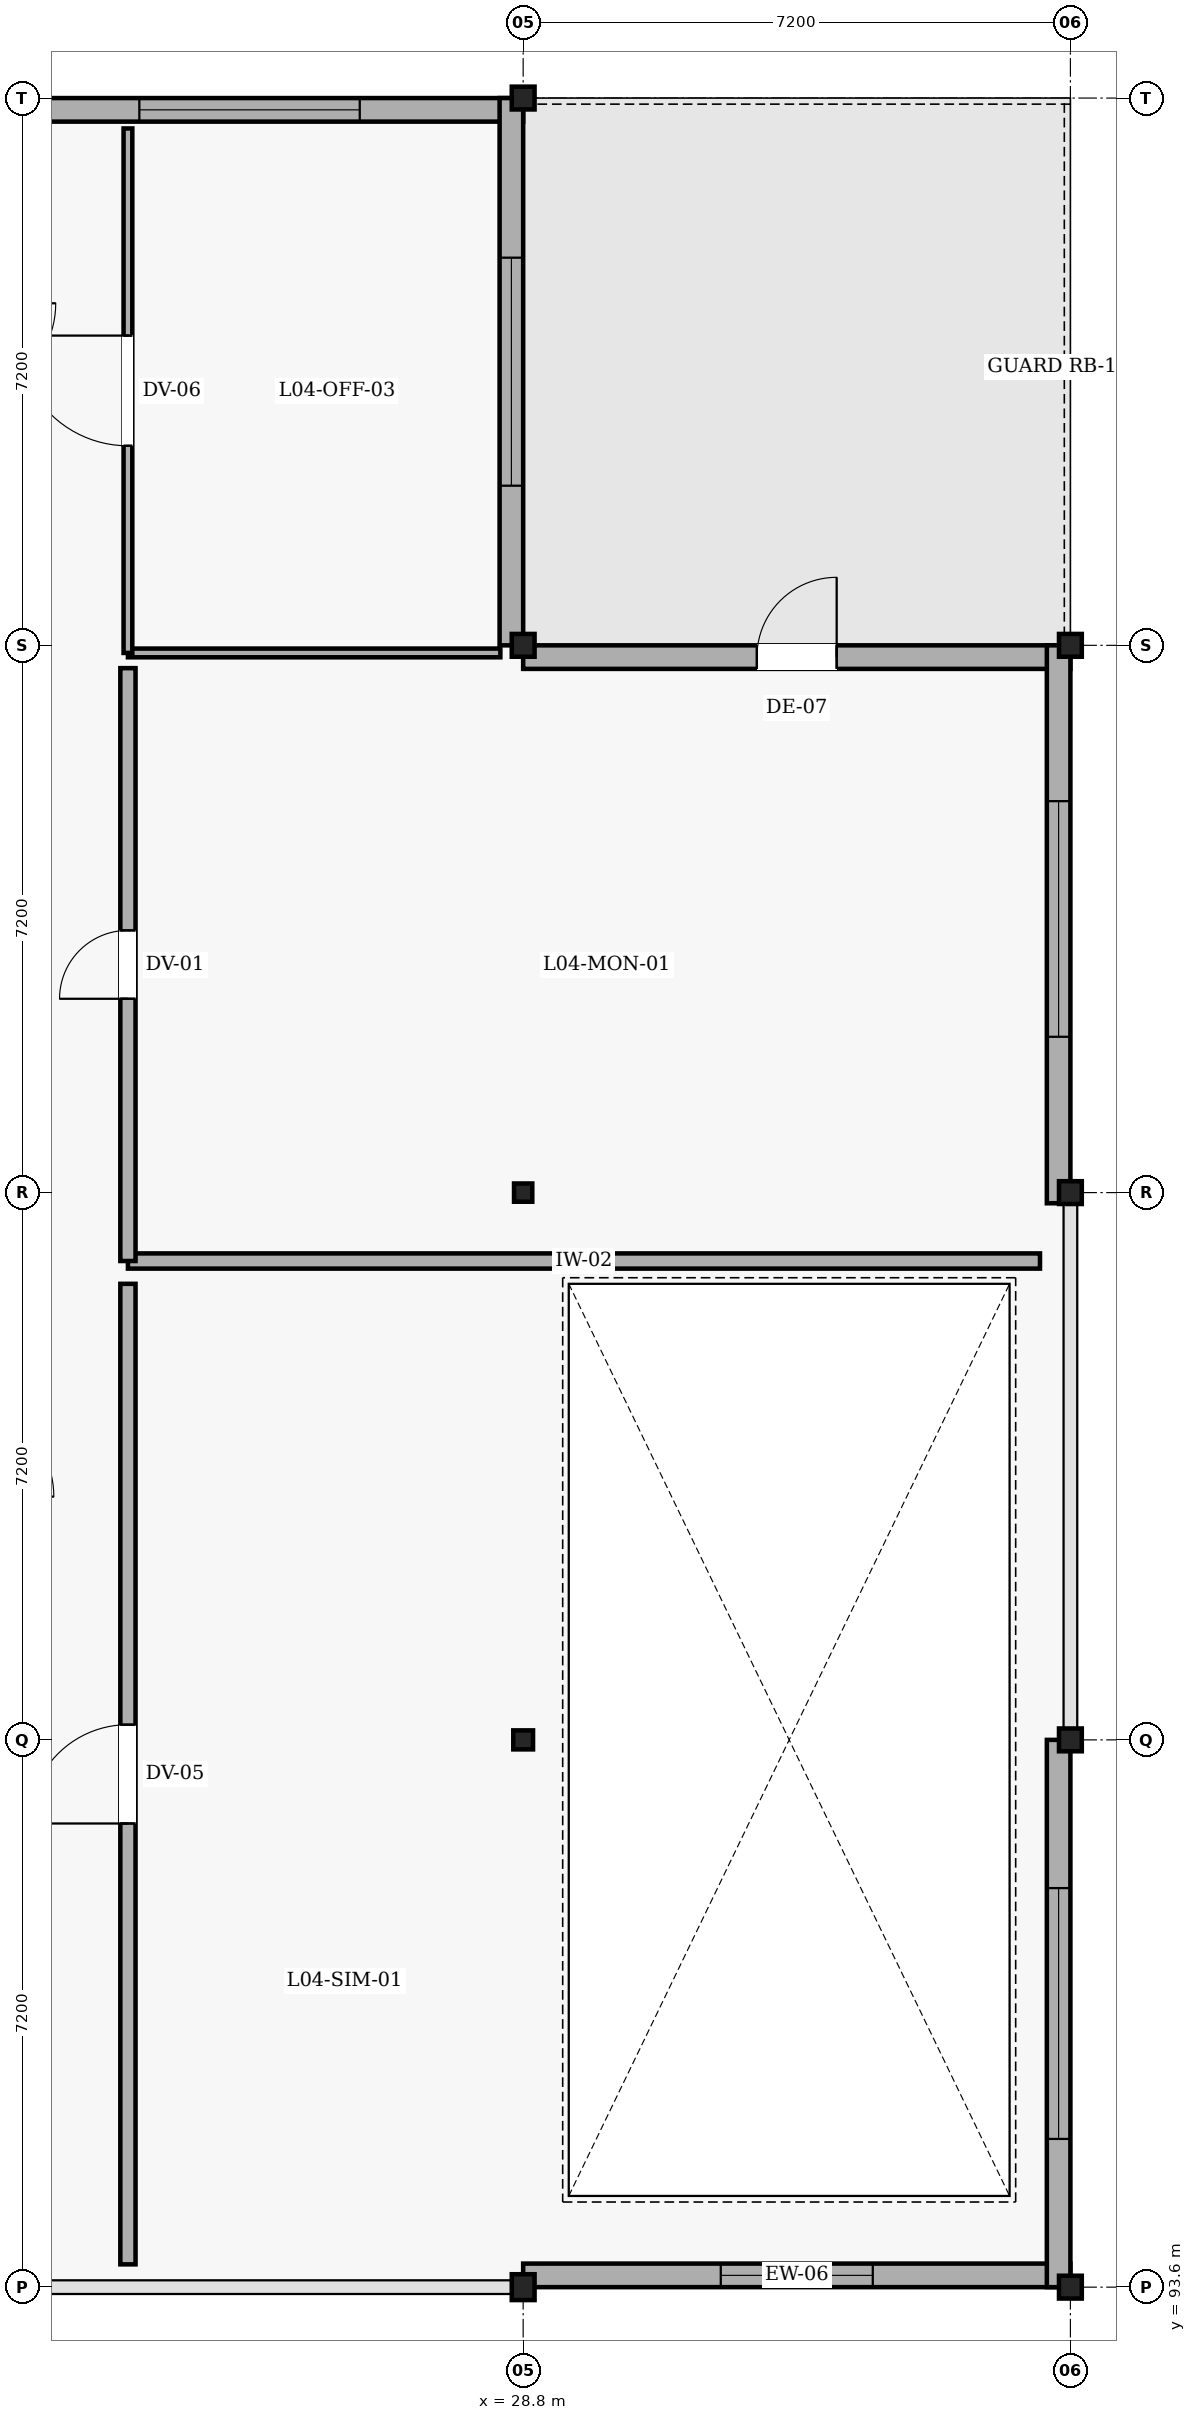
"""IFC4 building model, lengths in metres.
Left out: names, types, materials, properties, quantities, classifications, styles, units other than length and angle.
Written with IfcOpenShell. Run it as: python <this file> out.ifc"""

import sys

from ifc_helpers import new_model, si_unit, direction, frame, frame_2d, origin, origin_2d, place, context, subcontext, project, spatial, rectangle, hollow_rectangle, i_section, extrude, element, fill, save


model = new_model("IFC4")
c1 = context("Model", 3, precision=1e-05, world=origin(), true_north=direction((0.0, 1.0)))
c2 = subcontext(c1, "Body", "Model", "MODEL_VIEW")
j1 = project(units=[si_unit("LENGTHUNIT", "METRE"), si_unit("PLANEANGLEUNIT", "RADIAN")], contexts=[c1])
p1 = place(None, origin())
s1 = spatial("IfcSite", under=j1, at=p1, CompositionType="ELEMENT")
p2 = place(p1, origin())
s2 = spatial("IfcBuilding", under=s1, at=p2, CompositionType="ELEMENT")
p3 = place(p2, frame((0.0, 0.0, 18.0)))
s3 = spatial("IfcBuildingStorey", under=s2, at=p3, CompositionType="ELEMENT", Elevation=18.0)
p4 = place(p3, frame((28.8, 93.6, 0.0), z_axis=(0.0, 0.0, 1.0), x_axis=(1.0, 0.0, 0.0)))
e1 = element("IfcColumn", 1, at=p4, inside=s3, PredefinedType="COLUMN", context=c2, shape_type="SweptSolid", body=[
    extrude(i_section(OverallWidth=0.3, OverallDepth=0.34, WebThickness=0.012, FlangeThickness=0.021, FilletRadius=0.027, at=origin_2d()), origin(), (0.0, 0.0, 1.0), 3.3),
])
p5 = place(p3, frame((28.8, 100.8, 0.0), z_axis=(0.0, 0.0, 1.0), x_axis=(1.0, 0.0, 0.0)))
e2 = element("IfcColumn", 2, at=p5, inside=s3, PredefinedType="COLUMN", context=c2, shape_type="SweptSolid", body=[
    extrude(i_section(OverallWidth=0.26, OverallDepth=0.25, WebThickness=0.008, FlangeThickness=0.012, FilletRadius=0.024, at=origin_2d()), origin(), (0.0, 0.0, 1.0), 3.3),
])
p6 = place(p3, frame((28.8, 108.0, 0.0), z_axis=(0.0, 0.0, 1.0), x_axis=(1.0, 0.0, 0.0)))
e3 = element("IfcColumn", 3, at=p6, inside=s3, PredefinedType="COLUMN", context=c2, shape_type="SweptSolid", body=[
    extrude(i_section(OverallWidth=0.24, OverallDepth=0.24, WebThickness=0.01, FlangeThickness=0.017, FilletRadius=0.021, at=origin_2d()), origin(), (0.0, 0.0, 1.0), 3.3),
])
for number, where, z_axis, x_axis in (
    (4, (28.8, 115.2, 0.0), (0.0, 0.0, 1.0), (1.0, 0.0, 0.0)),
    (5, (28.8, 122.4, 0.0), (0.0, 0.0, 1.0), (1.0, 0.0, 0.0)),
):
    element("IfcColumn", number, at=place(p3, frame(where, z_axis=z_axis, x_axis=x_axis)), inside=s3, PredefinedType="COLUMN", context=c2, shape_type="SweptSolid", body=[
        extrude(hollow_rectangle(XDim=0.3, YDim=0.3, WallThickness=0.012, at=origin_2d()), origin(), (0.0, 0.0, 1.0), 3.3),
    ])
for number, where, z_axis, x_axis in (
    (6, (36.0, 93.6, 0.0), (0.0, 0.0, 1.0), (1.0, 0.0, 0.0)),
    (7, (36.0, 100.8, 0.0), (0.0, 0.0, 1.0), (1.0, 0.0, 0.0)),
    (8, (36.0, 108.0, 0.0), (0.0, 0.0, 1.0), (1.0, 0.0, 0.0)),
    (9, (36.0, 115.2, 0.0), (0.0, 0.0, 1.0), (1.0, 0.0, 0.0)),
):
    element("IfcColumn", number, at=place(p3, frame(where, z_axis=z_axis, x_axis=x_axis)), inside=s3, PredefinedType="COLUMN", context=c2, shape_type="SweptSolid", body=[
        extrude(hollow_rectangle(XDim=0.3, YDim=0.3, WallThickness=0.012, at=origin_2d()), origin(), (0.0, 0.0, 1.0), 3.36),
    ])
p7 = place(p3, frame((36.0, 93.755, 0.0), z_axis=(0.0, 0.0, 1.0), x_axis=(-1.0, 0.0, 0.0)))
e10 = element("IfcWall", 10, at=p7, inside=s3, PredefinedType="SOLIDWALL", context=c2, shape_type="SweptSolid", body=[
    extrude(rectangle(XDim=7.2, YDim=0.31, at=frame_2d((3.6, 0.0))), origin(), (0.0, 0.0, 1.0), 3.06),
])
p8 = place(p7, frame((2.6, 0.0, 0.9)))
e11 = element("IfcOpeningElement", 11, at=p8, cuts=e10, PredefinedType="OPENING", context=c2, shape_type="SweptSolid", body=[
    extrude(rectangle(XDim=2.0, YDim=1.65, at=frame_2d((1.0, 0.825))), frame((0.0, 0.165, 0.0), z_axis=(0.0, -1.0, 0.0), x_axis=(1.0, 0.0, 0.0)), (0.0, 0.0, 1.0), 0.33),
])
p9 = place(p3, frame((21.6, 122.245, 0.0), z_axis=(0.0, 0.0, 1.0), x_axis=(1.0, 0.0, 0.0)))
e12 = element("IfcWall", 12, at=p9, inside=s3, PredefinedType="SOLIDWALL", context=c2, shape_type="SweptSolid", body=[
    extrude(rectangle(XDim=7.2, YDim=0.31, at=frame_2d((3.6, 0.0))), origin(), (0.0, 0.0, 1.0), 3.0),
])
p10 = place(p9, frame((2.15, 0.0, 0.9)))
e13 = element("IfcOpeningElement", 13, at=p10, cuts=e12, PredefinedType="OPENING", context=c2, shape_type="SweptSolid", body=[
    extrude(rectangle(XDim=2.9, YDim=1.7, at=frame_2d((1.45, 0.85))), frame((0.0, 0.165, 0.0), z_axis=(0.0, -1.0, 0.0), x_axis=(1.0, 0.0, 0.0)), (0.0, 0.0, 1.0), 0.33),
])
p11 = place(p3, frame((28.645, 122.4, 0.0), z_axis=(0.0, 0.0, 1.0), x_axis=(0.0, -1.0, 0.0)))
e14 = element("IfcWall", 14, at=p11, inside=s3, PredefinedType="SOLIDWALL", context=c2, shape_type="SweptSolid", body=[
    extrude(rectangle(XDim=7.2, YDim=0.31, at=frame_2d((3.6, 0.0))), origin(), (0.0, 0.0, 1.0), 3.0),
])
p12 = place(p11, frame((2.1, 0.0, 0.9)))
e15 = element("IfcOpeningElement", 15, at=p12, cuts=e14, PredefinedType="OPENING", context=c2, shape_type="SweptSolid", body=[
    extrude(rectangle(XDim=3.0, YDim=1.75, at=frame_2d((1.5, 0.875))), frame((0.0, 0.165, 0.0), z_axis=(0.0, -1.0, 0.0), x_axis=(1.0, 0.0, 0.0)), (0.0, 0.0, 1.0), 0.33),
])
p13 = place(p3, frame((28.8, 115.045, 0.0), z_axis=(0.0, 0.0, 1.0), x_axis=(1.0, 0.0, 0.0)))
e16 = element("IfcWall", 16, at=p13, inside=s3, PredefinedType="SOLIDWALL", context=c2, shape_type="SweptSolid", body=[
    extrude(rectangle(XDim=7.2, YDim=0.31, at=frame_2d((3.6, 0.0))), origin(), (0.0, 0.0, 1.0), 3.06),
])
p14 = place(p13, frame((3.075, 0.0, 0.0)))
e17 = element("IfcOpeningElement", 17, at=p14, cuts=e16, PredefinedType="OPENING", context=c2, shape_type="SweptSolid", body=[
    extrude(rectangle(XDim=1.05, YDim=2.2, at=frame_2d((0.525, 1.1))), frame((0.0, 0.165, 0.0), z_axis=(0.0, -1.0, 0.0), x_axis=(1.0, 0.0, 0.0)), (0.0, 0.0, 1.0), 0.33),
])
p15 = place(p3, frame((35.845, 115.2, 0.0), z_axis=(0.0, 0.0, 1.0), x_axis=(0.0, -1.0, 0.0)))
e18 = element("IfcWall", 18, at=p15, inside=s3, PredefinedType="SOLIDWALL", context=c2, shape_type="SweptSolid", body=[
    extrude(rectangle(XDim=7.34, YDim=0.31, at=frame_2d((3.67, 0.0))), origin(), (0.0, 0.0, 1.0), 3.06),
])
p16 = place(p15, frame((2.05, 0.0, 0.9)))
e19 = element("IfcOpeningElement", 19, at=p16, cuts=e18, PredefinedType="OPENING", context=c2, shape_type="SweptSolid", body=[
    extrude(rectangle(XDim=3.1, YDim=1.8, at=frame_2d((1.55, 0.9))), frame((0.0, 0.165, 0.0), z_axis=(0.0, -1.0, 0.0), x_axis=(1.0, 0.0, 0.0)), (0.0, 0.0, 1.0), 0.33),
])
p17 = place(p3, frame((35.845, 100.8, 0.0), z_axis=(0.0, 0.0, 1.0), x_axis=(0.0, -1.0, 0.0)))
e20 = element("IfcWall", 20, at=p17, inside=s3, PredefinedType="SOLIDWALL", context=c2, shape_type="SweptSolid", body=[
    extrude(rectangle(XDim=7.2, YDim=0.31, at=frame_2d((3.6, 0.0))), origin(), (0.0, 0.0, 1.0), 3.06),
])
p18 = place(p17, frame((1.95, 0.0, 0.9)))
e21 = element("IfcOpeningElement", 21, at=p18, cuts=e20, PredefinedType="OPENING", context=c2, shape_type="SweptSolid", body=[
    extrude(rectangle(XDim=3.3, YDim=1.65, at=frame_2d((1.65, 0.825))), frame((0.0, 0.165, 0.0), z_axis=(0.0, -1.0, 0.0), x_axis=(1.0, 0.0, 0.0)), (0.0, 0.0, 1.0), 0.33),
])
p19 = place(p3, frame((35.6, 107.1, 0.0), z_axis=(0.0, 0.0, 1.0), x_axis=(-1.0, 0.0, 0.0)))
e22 = element("IfcWall", 22, at=p19, inside=s3, PredefinedType="PARTITIONING", context=c2, shape_type="SweptSolid", body=[
    extrude(rectangle(XDim=12.0, YDim=0.2, at=frame_2d((6.0, 0.0))), origin(), (0.0, 0.0, 1.0), 3.0),
])
p20 = place(p3, frame((23.6, 107.1, 0.0), z_axis=(0.0, 0.0, 1.0), x_axis=(0.0, 1.0, 0.0)))
e23 = element("IfcWall", 23, at=p20, inside=s3, PredefinedType="PARTITIONING", context=c2, shape_type="SweptSolid", body=[
    extrude(rectangle(XDim=7.8, YDim=0.2, at=frame_2d((3.9, 0.0))), origin(), (0.0, 0.0, 1.0), 2.85),
])
p21 = place(p20, frame((3.45, 0.0, 0.0)))
e24 = element("IfcOpeningElement", 24, at=p21, cuts=e23, PredefinedType="OPENING", context=c2, shape_type="SweptSolid", body=[
    extrude(rectangle(XDim=0.9, YDim=2.1, at=frame_2d((0.45, 1.05))), frame((0.0, 0.11, 0.0), z_axis=(0.0, -1.0, 0.0), x_axis=(1.0, 0.0, 0.0)), (0.0, 0.0, 1.0), 0.22),
])
p22 = place(p3, frame((23.6, 93.9, 0.0), z_axis=(0.0, 0.0, 1.0), x_axis=(0.0, 1.0, 0.0)))
e25 = element("IfcWall", 25, at=p22, inside=s3, PredefinedType="PARTITIONING", context=c2, shape_type="SweptSolid", body=[
    extrude(rectangle(XDim=12.9, YDim=0.2, at=frame_2d((6.45, 0.0))), origin(), (0.0, 0.0, 1.0), 2.85),
])
p23 = place(p22, frame((5.8, 0.0, 0.0)))
e26 = element("IfcOpeningElement", 26, at=p23, cuts=e25, PredefinedType="OPENING", context=c2, shape_type="SweptSolid", body=[
    extrude(rectangle(XDim=1.3, YDim=2.2, at=frame_2d((0.65, 1.1))), frame((0.0, 0.11, 0.0), z_axis=(0.0, -1.0, 0.0), x_axis=(1.0, 0.0, 0.0)), (0.0, 0.0, 1.0), 0.22),
])
p24 = place(p3, frame((28.5, 115.1, 0.0), z_axis=(0.0, 0.0, 1.0), x_axis=(-1.0, 0.0, 0.0)))
e27 = element("IfcWall", 27, at=p24, inside=s3, PredefinedType="PARTITIONING", context=c2, shape_type="SweptSolid", body=[
    extrude(rectangle(XDim=4.9, YDim=0.115, at=frame_2d((2.45, 0.0))), origin(), (0.0, 0.0, 1.0), 2.85),
])
p25 = place(p3, frame((23.6, 115.1, 0.0), z_axis=(0.0, 0.0, 1.0), x_axis=(0.0, 1.0, 0.0)))
e28 = element("IfcWall", 28, at=p25, inside=s3, PredefinedType="PARTITIONING", context=c2, shape_type="SweptSolid", body=[
    extrude(rectangle(XDim=6.9, YDim=0.115, at=frame_2d((3.45, 0.0))), origin(), (0.0, 0.0, 1.0), 2.85),
])
p26 = place(p25, frame((2.725, 0.0, 0.0)))
e29 = element("IfcOpeningElement", 29, at=p26, cuts=e28, PredefinedType="OPENING", context=c2, shape_type="SweptSolid", body=[
    extrude(rectangle(XDim=1.45, YDim=2.2, at=frame_2d((0.725, 1.1))), frame((0.0, 0.067, 0.0), z_axis=(0.0, -1.0, 0.0), x_axis=(1.0, 0.0, 0.0)), (0.0, 0.0, 1.0), 0.135),
])
p27 = place(p8, origin())
e30 = element("IfcWindow", 30, at=p27, inside=s3, PartitioningType="SINGLE_PANEL", PredefinedType="WINDOW", context=c2, shape_type="SweptSolid", body=[
    extrude(rectangle(XDim=2.0, YDim=1.65, at=frame_2d((1.0, 0.825))), frame((0.0, 0.03, 0.0), z_axis=(0.0, -1.0, 0.0), x_axis=(1.0, 0.0, 0.0)), (0.0, 0.0, 1.0), 0.06),
])
fill(e11, e30)
p28 = place(p10, origin())
e31 = element("IfcWindow", 31, at=p28, inside=s3, PartitioningType="SINGLE_PANEL", PredefinedType="WINDOW", context=c2, shape_type="SweptSolid", body=[
    extrude(rectangle(XDim=2.9, YDim=1.7, at=frame_2d((1.45, 0.85))), frame((0.0, 0.03, 0.0), z_axis=(0.0, -1.0, 0.0), x_axis=(1.0, 0.0, 0.0)), (0.0, 0.0, 1.0), 0.06),
])
fill(e13, e31)
p29 = place(p12, origin())
e32 = element("IfcWindow", 32, at=p29, inside=s3, PartitioningType="SINGLE_PANEL", PredefinedType="WINDOW", context=c2, shape_type="SweptSolid", body=[
    extrude(rectangle(XDim=3.0, YDim=1.75, at=frame_2d((1.5, 0.875))), frame((0.0, 0.03, 0.0), z_axis=(0.0, -1.0, 0.0), x_axis=(1.0, 0.0, 0.0)), (0.0, 0.0, 1.0), 0.06),
])
fill(e15, e32)
p30 = place(p14, origin())
e33 = element("IfcDoor", 33, at=p30, inside=s3, OperationType="SINGLE_SWING_RIGHT", PredefinedType="DOOR", context=c2, shape_type="SweptSolid", body=[
    extrude(rectangle(XDim=1.05, YDim=2.2, at=frame_2d((0.525, 1.1))), frame((0.0, 0.025, 0.0), z_axis=(0.0, -1.0, 0.0), x_axis=(1.0, 0.0, 0.0)), (0.0, 0.0, 1.0), 0.05),
])
fill(e17, e33)
p31 = place(p16, origin())
e34 = element("IfcWindow", 34, at=p31, inside=s3, PartitioningType="SINGLE_PANEL", PredefinedType="WINDOW", context=c2, shape_type="SweptSolid", body=[
    extrude(rectangle(XDim=3.1, YDim=1.8, at=frame_2d((1.55, 0.9))), frame((0.0, 0.03, 0.0), z_axis=(0.0, -1.0, 0.0), x_axis=(1.0, 0.0, 0.0)), (0.0, 0.0, 1.0), 0.06),
])
fill(e19, e34)
p32 = place(p18, origin())
e35 = element("IfcWindow", 35, at=p32, inside=s3, PartitioningType="SINGLE_PANEL", PredefinedType="WINDOW", context=c2, shape_type="SweptSolid", body=[
    extrude(rectangle(XDim=3.3, YDim=1.65, at=frame_2d((1.65, 0.825))), frame((0.0, 0.03, 0.0), z_axis=(0.0, -1.0, 0.0), x_axis=(1.0, 0.0, 0.0)), (0.0, 0.0, 1.0), 0.06),
])
fill(e21, e35)
p33 = place(p21, origin())
e36 = element("IfcDoor", 36, at=p33, inside=s3, OperationType="SINGLE_SWING_LEFT", PredefinedType="DOOR", context=c2, shape_type="SweptSolid", body=[
    extrude(rectangle(XDim=0.9, YDim=2.1, at=frame_2d((0.45, 1.05))), frame((0.0, 0.025, 0.0), z_axis=(0.0, -1.0, 0.0), x_axis=(1.0, 0.0, 0.0)), (0.0, 0.0, 1.0), 0.05),
])
fill(e24, e36)
p34 = place(p23, origin())
e37 = element("IfcDoor", 37, at=p34, inside=s3, OperationType="SINGLE_SWING_LEFT", PredefinedType="DOOR", context=c2, shape_type="SweptSolid", body=[
    extrude(rectangle(XDim=1.3, YDim=2.2, at=frame_2d((0.65, 1.1))), frame((0.0, 0.025, 0.0), z_axis=(0.0, -1.0, 0.0), x_axis=(1.0, 0.0, 0.0)), (0.0, 0.0, 1.0), 0.05),
])
fill(e26, e37)
p35 = place(p26, origin())
e38 = element("IfcDoor", 38, at=p35, inside=s3, OperationType="SINGLE_SWING_RIGHT", PredefinedType="DOOR", context=c2, shape_type="SweptSolid", body=[
    extrude(rectangle(XDim=1.45, YDim=2.2, at=frame_2d((0.725, 1.1))), frame((0.0, 0.025, 0.0), z_axis=(0.0, -1.0, 0.0), x_axis=(1.0, 0.0, 0.0)), (0.0, 0.0, 1.0), 0.05),
])
fill(e29, e38)
save(model, sys.argv[1])
